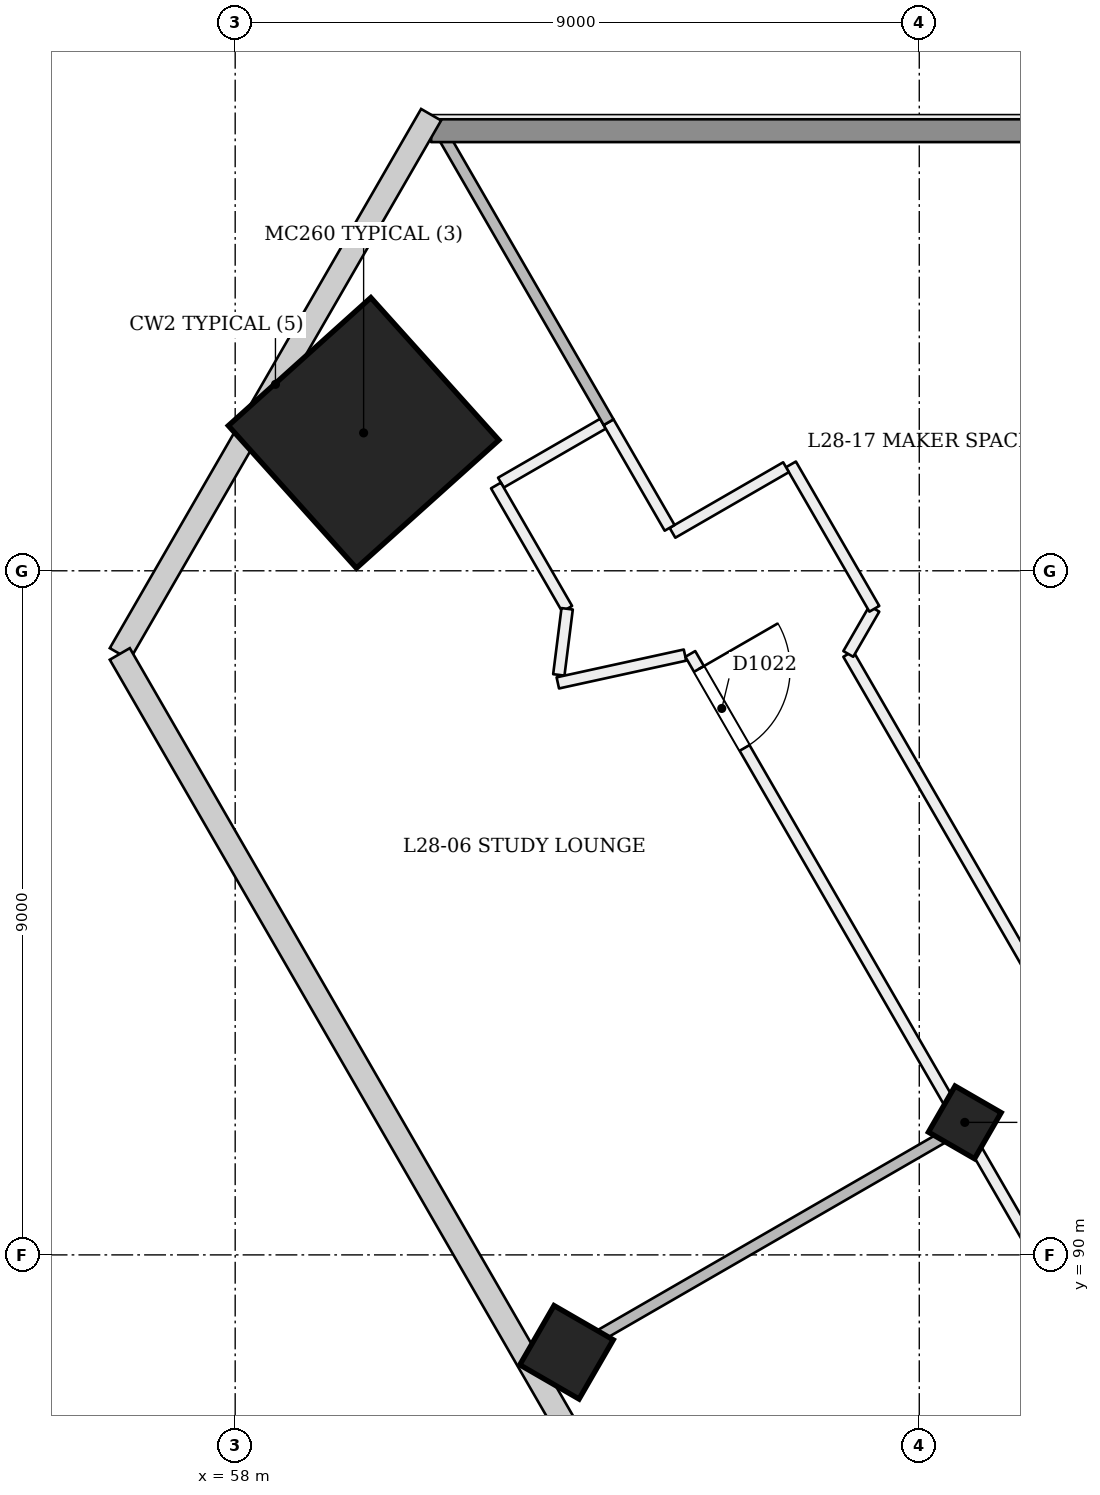
"""IFC4 building model, lengths in metres.
Left out: names, types, materials, properties, quantities, classifications, styles, units other than length and angle.
Written with IfcOpenShell. Run it as: python <this file> out.ifc"""

import sys

from ifc_helpers import new_model, si_unit, direction, frame, frame_2d, origin, origin_2d, place, context, subcontext, project, spatial, rectangle, extrude, element, fill, save


model = new_model("IFC4")
c1 = context("Model", 3, precision=1e-05, world=origin(), true_north=direction((0.0, 1.0)))
c2 = subcontext(c1, "Body", "Model", "MODEL_VIEW")
j1 = project(units=[si_unit("LENGTHUNIT", "METRE"), si_unit("PLANEANGLEUNIT", "RADIAN")], contexts=[c1])
p1 = place(None, origin())
s1 = spatial("IfcSite", under=j1, at=p1, CompositionType="ELEMENT")
p2 = place(p1, origin())
s2 = spatial("IfcBuilding", under=s1, at=p2, CompositionType="ELEMENT")
p3 = place(p2, frame((0.0, 0.0, 111.6)))
s3 = spatial("IfcBuildingStorey", under=s2, at=p3, CompositionType="ELEMENT", Elevation=111.6)
p4 = place(p3, frame((67.572, 91.696, -0.021), z_axis=(0.022155133694, 0.038483534979, 0.999013597298), x_axis=(-0.864979671095, -0.500331180667, 0.038456186034)))
e1 = element("IfcColumn", 1, at=p4, inside=s3, PredefinedType="COLUMN", context=c2, shape_type="SweptSolid", body=[
    extrude(rectangle(XDim=0.7, YDim=0.7, at=origin_2d()), origin(), (0.0, 0.0, 1.0), 3.604),
])
p5 = place(p3, frame((59.656, 100.803, 0.0), z_axis=(0.028336004223, 0.009219369795, 0.999555938447), x_axis=(-0.865474489421, 0.500556866764, 0.019918114798)))
e2 = element("IfcColumn", 2, at=p5, inside=s3, PredefinedType="COLUMN", context=c2, shape_type="SweptSolid", body=[
    extrude(rectangle(XDim=2.52, YDim=2.52, at=origin_2d()), origin(), (0.0, 0.0, 1.0), 3.602),
])
p6 = place(p3, frame((62.332, 88.671, -0.027), z_axis=(0.022222910879, 0.038415824599, 0.999014697916), x_axis=(-0.86602133979, -0.49852764231, 0.038434735344)))
e3 = element("IfcColumn", 3, at=p6, inside=s3, PredefinedType="COLUMN", context=c2, shape_type="SweptSolid", body=[
    extrude(rectangle(XDim=0.9, YDim=0.9, at=origin_2d()), origin(), (0.0, 0.0, 1.0), 3.604),
])
p7 = place(p3, frame((62.838, 100.935, 0.0), z_axis=(0.0, 0.0, 1.0), x_axis=(-0.865975732936, -0.500086022567, 0.0)))
e4 = element("IfcWall", 4, at=p7, inside=s3, PredefinedType="PARTITIONING", context=c2, shape_type="SweptSolid", body=[
    extrude(rectangle(XDim=1.55, YDim=0.15, at=frame_2d((0.775, 0.0))), origin(), (0.0, 0.0, 1.0), 3.1),
])
p8 = place(p3, frame((61.431, 100.122, 0.0), z_axis=(0.0, 0.0, 1.0), x_axis=(0.499951854219, -0.86605319898, 0.0)))
e5 = element("IfcWall", 5, at=p8, inside=s3, PredefinedType="PARTITIONING", context=c2, shape_type="SweptSolid", body=[
    extrude(rectangle(XDim=1.873, YDim=0.15, at=frame_2d((0.937, 0.0))), origin(), (0.0, 0.0, 1.0), 3.1),
])
p9 = place(p3, frame((62.367, 98.5, 0.0), z_axis=(0.0, 0.0, 1.0), x_axis=(-0.125097682957, -0.992144429868, 0.0)))
e6 = element("IfcWall", 6, at=p9, inside=s3, PredefinedType="PARTITIONING", context=c2, shape_type="SweptSolid", body=[
    extrude(rectangle(XDim=0.876, YDim=0.15, at=frame_2d((0.438, 0.0))), origin(), (0.0, 0.0, 1.0), 3.1),
])
p10 = place(p3, frame((62.245, 97.525, 0.0), z_axis=(0.0, 0.0, 1.0), x_axis=(0.976932556005, 0.213548076594, 0.0)))
e7 = element("IfcWall", 7, at=p10, inside=s3, PredefinedType="PARTITIONING", context=c2, shape_type="SweptSolid", body=[
    extrude(rectangle(XDim=1.713, YDim=0.15, at=frame_2d((0.856, 0.0))), origin(), (0.0, 0.0, 1.0), 3.1),
])
p11 = place(p3, frame((63.988, 97.906, 0.0), z_axis=(0.0, 0.0, 1.0), x_axis=(0.500001579174, -0.866024492046, 0.0)))
e8 = element("IfcWall", 8, at=p11, inside=s3, PredefinedType="PARTITIONING", context=c2, shape_type="SweptSolid", body=[
    extrude(rectangle(XDim=41.339, YDim=0.15, at=frame_2d((20.669, 0.0))), origin(), (0.0, 0.0, 1.0), 2.7),
])
p12 = place(p11, frame((0.228, 0.0, 0.0)))
e9 = element("IfcOpeningElement", 9, at=p12, cuts=e8, PredefinedType="OPENING", context=c2, shape_type="SweptSolid", body=[
    extrude(rectangle(XDim=1.2, YDim=2.1, at=frame_2d((0.6, 1.05))), frame((0.0, 0.085, 0.0), z_axis=(0.0, -1.0, 0.0), x_axis=(1.0, 0.0, 0.0)), (0.0, 0.0, 1.0), 0.171),
])
p13 = place(p11, frame((11.07, 0.0, 0.0)))
e10 = element("IfcOpeningElement", 10, at=p13, cuts=e8, PredefinedType="OPENING", context=c2, shape_type="SweptSolid", body=[
    extrude(rectangle(XDim=1.2, YDim=2.1, at=frame_2d((0.6, 1.05))), frame((0.0, 0.085, 0.0), z_axis=(0.0, -1.0, 0.0), x_axis=(1.0, 0.0, 0.0)), (0.0, 0.0, 1.0), 0.171),
])
p14 = place(p11, frame((22.32, 0.0, 0.0)))
e11 = element("IfcOpeningElement", 11, at=p14, cuts=e8, PredefinedType="OPENING", context=c2, shape_type="SweptSolid", body=[
    extrude(rectangle(XDim=1.2, YDim=2.1, at=frame_2d((0.6, 1.05))), frame((0.0, 0.085, 0.0), z_axis=(0.0, -1.0, 0.0), x_axis=(1.0, 0.0, 0.0)), (0.0, 0.0, 1.0), 0.171),
])
p15 = place(p11, frame((32.47, 0.0, 0.0)))
e12 = element("IfcOpeningElement", 12, at=p15, cuts=e8, PredefinedType="OPENING", context=c2, shape_type="SweptSolid", body=[
    extrude(rectangle(XDim=1.2, YDim=2.1, at=frame_2d((0.6, 1.05))), frame((0.0, 0.085, 0.0), z_axis=(0.0, -1.0, 0.0), x_axis=(1.0, 0.0, 0.0)), (0.0, 0.0, 1.0), 0.171),
])
p16 = place(p11, frame((39.758, 0.0, 0.0)))
e13 = element("IfcOpeningElement", 13, at=p16, cuts=e8, PredefinedType="OPENING", context=c2, shape_type="SweptSolid", body=[
    extrude(rectangle(XDim=1.0, YDim=2.1, at=frame_2d((0.5, 1.05))), frame((0.0, 0.085, 0.0), z_axis=(0.0, -1.0, 0.0), x_axis=(1.0, 0.0, 0.0)), (0.0, 0.0, 1.0), 0.171),
])
p17 = place(p3, frame((69.245, 92.4, 0.0), z_axis=(0.0, 0.0, 1.0), x_axis=(-0.499983931063, 0.866034680991, 0.0)))
e14 = element("IfcWall", 14, at=p17, inside=s3, PredefinedType="PARTITIONING", context=c2, shape_type="SweptSolid", body=[
    extrude(rectangle(XDim=6.358, YDim=0.15, at=frame_2d((3.179, 0.0))), origin(), (0.0, 0.0, 1.0), 3.1),
])
p18 = place(p3, frame((66.066, 97.906, 0.0), z_axis=(0.0, 0.0, 1.0), x_axis=(0.499969057507, 0.866043267704, 0.0)))
e15 = element("IfcWall", 15, at=p18, inside=s3, PredefinedType="PARTITIONING", context=c2, shape_type="SweptSolid", body=[
    extrude(rectangle(XDim=0.686, YDim=0.15, at=frame_2d((0.343, 0.0))), origin(), (0.0, 0.0, 1.0), 3.1),
])
p19 = place(p3, frame((66.409, 98.5, 0.0), z_axis=(0.0, 0.0, 1.0), x_axis=(-0.500005024956, 0.866022502605, 0.0)))
e16 = element("IfcWall", 16, at=p19, inside=s3, PredefinedType="PARTITIONING", context=c2, shape_type="SweptSolid", body=[
    extrude(rectangle(XDim=2.194, YDim=0.15, at=frame_2d((1.097, 0.0))), origin(), (0.0, 0.0, 1.0), 3.1),
])
p20 = place(p3, frame((65.247, 100.363, 0.0), z_axis=(0.0, 0.0, 1.0), x_axis=(-0.866013532718, -0.500020560727, 0.0)))
e17 = element("IfcWall", 17, at=p20, inside=s3, PredefinedType="PARTITIONING", context=c2, shape_type="SweptSolid", body=[
    extrude(rectangle(XDim=1.725, YDim=0.15, at=frame_2d((0.863, 0.0))), origin(), (0.0, 0.0, 1.0), 3.1),
])
p21 = place(p3, frame((63.716, 99.565, 0.0), z_axis=(0.0, 0.0, 1.0), x_axis=(-0.500016533484, 0.866015857963, 0.0)))
e18 = element("IfcWall", 18, at=p21, inside=s3, PredefinedType="PARTITIONING", context=c2, shape_type="SweptSolid", body=[
    extrude(rectangle(XDim=1.605, YDim=0.15, at=frame_2d((0.802, 0.0))), origin(), (0.0, 0.0, 1.0), 3.1),
])
p22 = place(p3, frame((62.03, 88.497, 0.0), z_axis=(0.0, 0.0, 1.0), x_axis=(0.866015887322, 0.500016482634, 0.0)))
e19 = element("IfcWall", 19, at=p22, inside=s3, PredefinedType="PARTITIONING", context=c2, shape_type="SweptSolid", body=[
    extrude(rectangle(XDim=6.325, YDim=0.15, at=frame_2d((3.163, 0.0))), origin(), (0.0, 0.0, 1.0), 2.6),
])
p23 = place(p3, frame((62.913, 100.955, 0.0), z_axis=(0.0, 0.0, 1.0), x_axis=(-0.499983800959, 0.866034756103, 0.0)))
e20 = element("IfcWall", 20, at=p23, inside=s3, PredefinedType="PARTITIONING", context=c2, shape_type="SweptSolid", body=[
    extrude(rectangle(XDim=4.555, YDim=0.15, at=frame_2d((2.278, 0.0))), origin(), (0.0, 0.0, 1.0), 2.6),
])
p24 = place(p3, frame((60.578, 104.79, 0.0), z_axis=(0.0, 0.0, 1.0), x_axis=(1.0, 0.0, 0.0)))
e21 = element("IfcWall", 21, at=p24, inside=s3, PredefinedType="SOLIDWALL", context=c2, shape_type="SweptSolid", body=[
    extrude(rectangle(XDim=48.845, YDim=0.3, at=frame_2d((24.422, 0.0))), origin(), (0.0, 0.0, 1.0), 2.6),
])
p25 = place(p12, origin())
e22 = element("IfcDoor", 22, at=p25, inside=s3, OperationType="SINGLE_SWING_LEFT", PredefinedType="NOTDEFINED", context=c2, shape_type="SweptSolid", body=[
    extrude(rectangle(XDim=1.2, YDim=2.1, at=frame_2d((0.6, 1.05))), frame((0.0, 0.025, 0.0), z_axis=(0.0, -1.0, 0.0), x_axis=(1.0, 0.0, 0.0)), (0.0, 0.0, 1.0), 0.05),
])
fill(e9, e22)
save(model, sys.argv[1])
